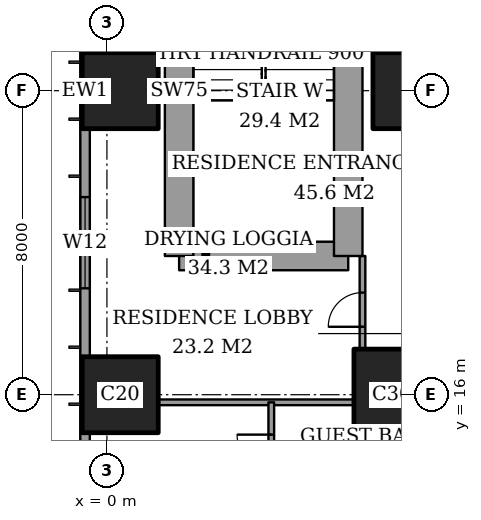
"""IFC4 building model, lengths in metres.
Left out: names, types, materials, properties, quantities, classifications, styles, units other than length and angle.
Written with IfcOpenShell. Run it as: python <this file> out.ifc"""

import sys

from ifc_helpers import new_model, si_unit, direction, frame, frame_2d, origin, origin_2d, place, context, subcontext, project, spatial, rectangle, extrude, element, fill, save


model = new_model("IFC4")
c1 = context("Model", 3, precision=1e-05, world=origin(), true_north=direction((0.0, 1.0)))
c2 = subcontext(c1, "Body", "Model", "MODEL_VIEW")
j1 = project(units=[si_unit("LENGTHUNIT", "METRE"), si_unit("PLANEANGLEUNIT", "RADIAN")], contexts=[c1])
p1 = place(None, origin())
s1 = spatial("IfcSite", under=j1, at=p1, CompositionType="ELEMENT")
p2 = place(p1, origin())
s2 = spatial("IfcBuilding", under=s1, at=p2, CompositionType="ELEMENT")
p3 = place(p2, frame((0.0, 0.0, 114.2)))
s3 = spatial("IfcBuildingStorey", under=s2, at=p3, CompositionType="ELEMENT", Elevation=114.2)
for number, where, z_axis, x_axis in (
    (1, (0.35, 16.0, 0.0), (0.0, 0.0, 1.0), (1.0, 0.0, 0.0)),
    (2, (0.35, 24.0, 0.0), (0.0, 0.0, 1.0), (1.0, 0.0, 0.0)),
):
    element("IfcColumn", number, at=place(p3, frame(where, z_axis=z_axis, x_axis=x_axis)), inside=s3, PredefinedType="COLUMN", context=c2, shape_type="SweptSolid", body=[
        extrude(rectangle(XDim=2.0, YDim=2.0, at=origin_2d()), origin(), (0.0, 0.0, 1.0), 3.6),
    ])
p4 = place(p3, frame((8.0, 16.0, 0.0), z_axis=(0.0, 0.0, 1.0), x_axis=(1.0, 0.0, 0.0)))
e3 = element("IfcColumn", 3, at=p4, inside=s3, PredefinedType="COLUMN", context=c2, shape_type="SweptSolid", body=[
    extrude(rectangle(XDim=3.0, YDim=2.4, at=origin_2d()), origin(), (0.0, 0.0, 1.0), 3.6),
])
p5 = place(p3, frame((8.0, 24.0, 0.0), z_axis=(0.0, 0.0, 1.0), x_axis=(1.0, 0.0, 0.0)))
e4 = element("IfcColumn", 4, at=p5, inside=s3, PredefinedType="COLUMN", context=c2, shape_type="SweptSolid", body=[
    extrude(rectangle(XDim=2.0, YDim=2.0, at=origin_2d()), origin(), (0.0, 0.0, 1.0), 3.6),
])
p6 = place(p3, frame((1.9, 19.65, 0.0), z_axis=(0.0, 0.0, 1.0), x_axis=(1.0, 0.0, 0.0)))
e5 = element("IfcWall", 5, at=p6, inside=s3, PredefinedType="SHEAR", context=c2, shape_type="SweptSolid", body=[
    extrude(rectangle(XDim=4.45, YDim=0.75, at=frame_2d((2.225, 0.0))), origin(), (0.0, 0.0, 1.0), 3.6),
])
p7 = place(p3, frame((6.35, 19.65, 0.0), z_axis=(0.0, 0.0, 1.0), x_axis=(0.0, 1.0, 0.0)))
e6 = element("IfcWall", 6, at=p7, inside=s3, PredefinedType="SHEAR", context=c2, shape_type="SweptSolid", body=[
    extrude(rectangle(XDim=8.7, YDim=0.75, at=frame_2d((4.35, 0.0))), origin(), (0.0, 0.0, 1.0), 3.6),
])
p8 = place(p7, frame((6.725, 0.0, 0.0)))
e7 = element("IfcOpeningElement", 7, at=p8, cuts=e6, PredefinedType="OPENING", context=c2, shape_type="SweptSolid", body=[
    extrude(rectangle(XDim=1.0, YDim=2.1, at=frame_2d((0.5, 1.05))), frame((0.0, 0.385, 0.0), z_axis=(0.0, -1.0, 0.0), x_axis=(1.0, 0.0, 0.0)), (0.0, 0.0, 1.0), 0.77),
])
p9 = place(p3, frame((1.9, 28.35, 0.0), z_axis=(0.0, 0.0, 1.0), x_axis=(0.0, -1.0, 0.0)))
e8 = element("IfcWall", 8, at=p9, inside=s3, PredefinedType="SHEAR", context=c2, shape_type="SweptSolid", body=[
    extrude(rectangle(XDim=8.7, YDim=0.75, at=frame_2d((4.35, 0.0))), origin(), (0.0, 0.0, 1.0), 3.6),
])
p10 = place(p3, frame((-0.575, 44.825, 0.0), z_axis=(0.0, 0.0, 1.0), x_axis=(0.0, -1.0, 0.0)))
e9 = element("IfcWall", 9, at=p10, inside=s3, PredefinedType="SOLIDWALL", context=c2, shape_type="SweptSolid", body=[
    extrude(rectangle(XDim=41.65, YDim=0.25, at=frame_2d((20.825, 0.0))), origin(), (0.0, 0.0, 1.0), 3.6),
])
p11 = place(p10, frame((0.775, 0.0, 0.4)))
e10 = element("IfcOpeningElement", 10, at=p11, cuts=e9, PredefinedType="OPENING", context=c2, shape_type="SweptSolid", body=[
    extrude(rectangle(XDim=2.4, YDim=2.2, at=frame_2d((1.2, 1.1))), frame((0.0, 0.135, 0.0), z_axis=(0.0, -1.0, 0.0), x_axis=(1.0, 0.0, 0.0)), (0.0, 0.0, 1.0), 0.27),
])
p12 = place(p10, frame((6.2, 0.0, 0.4)))
e11 = element("IfcOpeningElement", 11, at=p12, cuts=e9, PredefinedType="OPENING", context=c2, shape_type="SweptSolid", body=[
    extrude(rectangle(XDim=1.2, YDim=2.2, at=frame_2d((0.6, 1.1))), frame((0.0, 0.135, 0.0), z_axis=(0.0, -1.0, 0.0), x_axis=(1.0, 0.0, 0.0)), (0.0, 0.0, 1.0), 0.27),
])
p13 = place(p10, frame((8.525, 0.0, 0.4)))
e12 = element("IfcOpeningElement", 12, at=p13, cuts=e9, PredefinedType="OPENING", context=c2, shape_type="SweptSolid", body=[
    extrude(rectangle(XDim=2.4, YDim=2.2, at=frame_2d((1.2, 1.1))), frame((0.0, 0.135, 0.0), z_axis=(0.0, -1.0, 0.0), x_axis=(1.0, 0.0, 0.0)), (0.0, 0.0, 1.0), 0.27),
])
p14 = place(p10, frame((15.625, 0.0, 0.4)))
e13 = element("IfcOpeningElement", 13, at=p14, cuts=e9, PredefinedType="OPENING", context=c2, shape_type="SweptSolid", body=[
    extrude(rectangle(XDim=2.4, YDim=2.2, at=frame_2d((1.2, 1.1))), frame((0.0, 0.135, 0.0), z_axis=(0.0, -1.0, 0.0), x_axis=(1.0, 0.0, 0.0)), (0.0, 0.0, 1.0), 0.27),
])
p15 = place(p10, frame((23.625, 0.0, 0.4)))
e14 = element("IfcOpeningElement", 14, at=p15, cuts=e9, PredefinedType="OPENING", context=c2, shape_type="SweptSolid", body=[
    extrude(rectangle(XDim=2.4, YDim=2.2, at=frame_2d((1.2, 1.1))), frame((0.0, 0.135, 0.0), z_axis=(0.0, -1.0, 0.0), x_axis=(1.0, 0.0, 0.0)), (0.0, 0.0, 1.0), 0.27),
])
p16 = place(p10, frame((30.825, 0.0, 0.4)))
e15 = element("IfcOpeningElement", 15, at=p16, cuts=e9, PredefinedType="OPENING", context=c2, shape_type="SweptSolid", body=[
    extrude(rectangle(XDim=2.4, YDim=2.2, at=frame_2d((1.2, 1.1))), frame((0.0, 0.135, 0.0), z_axis=(0.0, -1.0, 0.0), x_axis=(1.0, 0.0, 0.0)), (0.0, 0.0, 1.0), 0.27),
])
p17 = place(p10, frame((34.5, 0.0, 0.4)))
e16 = element("IfcOpeningElement", 16, at=p17, cuts=e9, PredefinedType="OPENING", context=c2, shape_type="SweptSolid", body=[
    extrude(rectangle(XDim=1.2, YDim=2.2, at=frame_2d((0.6, 1.1))), frame((0.0, 0.135, 0.0), z_axis=(0.0, -1.0, 0.0), x_axis=(1.0, 0.0, 0.0)), (0.0, 0.0, 1.0), 0.27),
])
p18 = place(p10, frame((38.475, 0.0, 0.4)))
e17 = element("IfcOpeningElement", 17, at=p18, cuts=e9, PredefinedType="OPENING", context=c2, shape_type="SweptSolid", body=[
    extrude(rectangle(XDim=2.4, YDim=2.2, at=frame_2d((1.2, 1.1))), frame((0.0, 0.135, 0.0), z_axis=(0.0, -1.0, 0.0), x_axis=(1.0, 0.0, 0.0)), (0.0, 0.0, 1.0), 0.27),
])
p19 = place(p3, frame((1.35, 15.8, 0.0), z_axis=(0.0, 0.0, 1.0), x_axis=(1.0, 0.0, 0.0)))
e18 = element("IfcWall", 18, at=p19, inside=s3, PredefinedType="PARTITIONING", context=c2, shape_type="SweptSolid", body=[
    extrude(rectangle(XDim=5.15, YDim=0.15, at=frame_2d((2.575, 0.0))), origin(), (0.0, 0.0, 1.0), 3.35),
])
p20 = place(p3, frame((4.325, 13.2, 0.0), z_axis=(0.0, 0.0, 1.0), x_axis=(0.0, 1.0, 0.0)))
e19 = element("IfcWall", 19, at=p20, inside=s3, PredefinedType="PARTITIONING", context=c2, shape_type="SweptSolid", body=[
    extrude(rectangle(XDim=2.6, YDim=0.15, at=frame_2d((1.3, 0.0))), origin(), (0.0, 0.0, 1.0), 3.35),
])
p21 = place(p20, frame((0.85, 0.0, 0.0)))
e20 = element("IfcOpeningElement", 20, at=p21, cuts=e19, PredefinedType="OPENING", context=c2, shape_type="SweptSolid", body=[
    extrude(rectangle(XDim=0.9, YDim=2.1, at=frame_2d((0.45, 1.05))), frame((0.0, 0.085, 0.0), z_axis=(0.0, -1.0, 0.0), x_axis=(1.0, 0.0, 0.0)), (0.0, 0.0, 1.0), 0.17),
])
p22 = place(p3, frame((6.725, 10.6, 0.0), z_axis=(0.0, 0.0, 1.0), x_axis=(0.0, 1.0, 0.0)))
e21 = element("IfcWall", 21, at=p22, inside=s3, PredefinedType="PARTITIONING", context=c2, shape_type="SweptSolid", body=[
    extrude(rectangle(XDim=4.2, YDim=0.15, at=frame_2d((2.1, 0.0))), origin(), (0.0, 0.0, 1.0), 3.35),
])
p23 = place(p3, frame((6.725, 17.2, 0.0), z_axis=(0.0, 0.0, 1.0), x_axis=(0.0, 1.0, 0.0)))
e22 = element("IfcWall", 22, at=p23, inside=s3, PredefinedType="PARTITIONING", context=c2, shape_type="SweptSolid", body=[
    extrude(rectangle(XDim=2.45, YDim=0.15, at=frame_2d((1.225, 0.0))), origin(), (0.0, 0.0, 1.0), 3.35),
])
p24 = place(p23, frame((0.587, 0.0, 0.0)))
e23 = element("IfcOpeningElement", 23, at=p24, cuts=e22, PredefinedType="OPENING", context=c2, shape_type="SweptSolid", body=[
    extrude(rectangle(XDim=0.9, YDim=2.1, at=frame_2d((0.45, 1.05))), frame((0.0, 0.085, 0.0), z_axis=(0.0, -1.0, 0.0), x_axis=(1.0, 0.0, 0.0)), (0.0, 0.0, 1.0), 0.17),
])
p25 = place(p15, origin())
e24 = element("IfcWindow", 24, at=p25, inside=s3, PartitioningType="SINGLE_PANEL", PredefinedType="WINDOW", context=c2, shape_type="SweptSolid", body=[
    extrude(rectangle(XDim=2.4, YDim=2.2, at=frame_2d((1.2, 1.1))), frame((0.0, 0.03, 0.0), z_axis=(0.0, -1.0, 0.0), x_axis=(1.0, 0.0, 0.0)), (0.0, 0.0, 1.0), 0.06),
])
fill(e14, e24)
p26 = place(p21, origin())
e25 = element("IfcDoor", 25, at=p26, inside=s3, OperationType="SINGLE_SWING_LEFT", PredefinedType="DOOR", context=c2, shape_type="SweptSolid", body=[
    extrude(rectangle(XDim=0.9, YDim=2.1, at=frame_2d((0.45, 1.05))), frame((0.0, 0.025, 0.0), z_axis=(0.0, -1.0, 0.0), x_axis=(1.0, 0.0, 0.0)), (0.0, 0.0, 1.0), 0.05),
])
fill(e20, e25)
p27 = place(p24, origin())
e26 = element("IfcDoor", 26, at=p27, inside=s3, OperationType="SINGLE_SWING_RIGHT", PredefinedType="DOOR", context=c2, shape_type="SweptSolid", body=[
    extrude(rectangle(XDim=0.9, YDim=2.1, at=frame_2d((0.45, 1.05))), frame((0.0, 0.025, 0.0), z_axis=(0.0, -1.0, 0.0), x_axis=(1.0, 0.0, 0.0)), (0.0, 0.0, 1.0), 0.05),
])
fill(e23, e26)
save(model, sys.argv[1])
